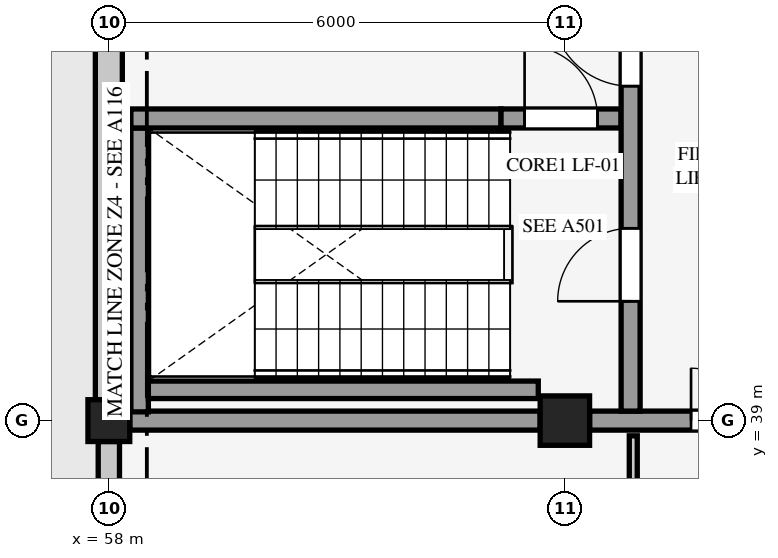
"""IFC4 building model, lengths in metres.
Left out: names, types, materials, properties, quantities, classifications, styles, units other than length and angle.
Written with IfcOpenShell. Run it as: python <this file> out.ifc"""

import sys

from ifc_helpers import new_model, si_unit, direction, frame, frame_2d, origin, origin_2d, place, context, subcontext, project, spatial, rectangle, extrude, element, fill, save


model = new_model("IFC4")
c1 = context("Model", 3, precision=1e-05, world=origin(), true_north=direction((0.0, 1.0)))
c2 = subcontext(c1, "Body", "Model", "MODEL_VIEW")
j1 = project(units=[si_unit("LENGTHUNIT", "METRE"), si_unit("PLANEANGLEUNIT", "RADIAN")], contexts=[c1])
p1 = place(None, origin())
s1 = spatial("IfcSite", under=j1, at=p1, CompositionType="ELEMENT")
p2 = place(p1, origin())
s2 = spatial("IfcBuilding", under=s1, at=p2, CompositionType="ELEMENT")
p3 = place(p2, frame((0.0, 0.0, 4.5)))
s3 = spatial("IfcBuildingStorey", under=s2, at=p3, CompositionType="ELEMENT", Elevation=4.5)
p4 = place(p3, frame((58.0, 39.0, 0.0), z_axis=(0.0, 0.0, 1.0), x_axis=(1.0, 0.0, 0.0)))
e1 = element("IfcColumn", 1, at=p4, inside=s3, PredefinedType="COLUMN", context=c2, shape_type="SweptSolid", body=[
    extrude(rectangle(XDim=0.55, YDim=0.55, at=origin_2d()), origin(), (0.0, 0.0, 1.0), 4.5),
])
p5 = place(p3, frame((64.0, 39.0, 0.0), z_axis=(0.0, 0.0, 1.0), x_axis=(1.0, 0.0, 0.0)))
e2 = element("IfcColumn", 2, at=p5, inside=s3, PredefinedType="COLUMN", context=c2, shape_type="SweptSolid", body=[
    extrude(rectangle(XDim=0.65, YDim=0.65, at=origin_2d()), origin(), (0.0, 0.0, 1.0), 4.5),
])
p6 = place(p3, frame((58.0, 33.25, 0.0), z_axis=(0.0, 0.0, 1.0), x_axis=(0.0, 1.0, 0.0)))
e3 = element("IfcWall", 3, at=p6, inside=s3, PredefinedType="SOLIDWALL", context=c2, shape_type="SweptSolid", body=[
    extrude(rectangle(XDim=5.475, YDim=0.28, at=frame_2d((2.738, 0.0))), origin(), (0.0, 0.0, 1.0), 3.821),
])
p7 = place(p6, frame((1.93, 0.0, 0.0)))
e4 = element("IfcOpeningElement", 4, at=p7, cuts=e3, PredefinedType="OPENING", context=c2, shape_type="SweptSolid", body=[
    extrude(rectangle(XDim=1.64, YDim=2.22, at=frame_2d((0.82, 1.11))), frame((0.0, 0.15, 0.0), z_axis=(0.0, -1.0, 0.0), x_axis=(1.0, 0.0, 0.0)), (0.0, 0.0, 1.0), 0.3),
])
p8 = place(p3, frame((58.0, 39.275, 0.0), z_axis=(0.0, 0.0, 1.0), x_axis=(0.0, 1.0, 0.0)))
e5 = element("IfcWall", 5, at=p8, inside=s3, PredefinedType="SOLIDWALL", context=c2, shape_type="SweptSolid", body=[
    extrude(rectangle(XDim=5.475, YDim=0.355, at=frame_2d((2.738, 0.0))), origin(), (0.0, 0.0, 1.0), 3.703),
])
p9 = place(p3, frame((58.275, 39.0, 0.0), z_axis=(0.0, 0.0, 1.0), x_axis=(1.0, 0.0, 0.0)))
e6 = element("IfcWall", 6, at=p9, inside=s3, PredefinedType="SHEAR", context=c2, shape_type="SweptSolid", body=[
    extrude(rectangle(XDim=5.4, YDim=0.25, at=frame_2d((2.7, 0.0))), origin(), (0.0, 0.0, 1.0), 4.228),
])
p10 = place(p3, frame((64.325, 39.0, 0.0), z_axis=(0.0, 0.0, 1.0), x_axis=(1.0, 0.0, 0.0)))
e7 = element("IfcWall", 7, at=p10, inside=s3, PredefinedType="SHEAR", context=c2, shape_type="SweptSolid", body=[
    extrude(rectangle(XDim=5.35, YDim=0.25, at=frame_2d((2.675, 0.0))), origin(), (0.0, 0.0, 1.0), 4.228),
])
p11 = place(p10, frame((1.335, 0.0, 0.0)))
e8 = element("IfcOpeningElement", 8, at=p11, cuts=e7, PredefinedType="OPENING", context=c2, shape_type="SweptSolid", body=[
    extrude(rectangle(XDim=1.38, YDim=2.16, at=frame_2d((0.69, 1.08))), frame((0.0, 0.135, 0.0), z_axis=(0.0, -1.0, 0.0), x_axis=(1.0, 0.0, 0.0)), (0.0, 0.0, 1.0), 0.27),
])
p12 = place(p3, frame((58.405, 39.115, 0.0), z_axis=(0.0, 0.0, 1.0), x_axis=(0.0, 1.0, 0.0)))
e9 = element("IfcWall", 9, at=p12, inside=s3, PredefinedType="SHEAR", context=c2, shape_type="SweptSolid", body=[
    extrude(rectangle(XDim=3.735, YDim=0.23, at=frame_2d((1.868, 0.0))), origin(), (0.0, 0.0, 1.0), 4.5),
])
p13 = place(p3, frame((58.52, 39.405, 0.0), z_axis=(0.0, 0.0, 1.0), x_axis=(1.0, 0.0, 0.0)))
e10 = element("IfcWall", 10, at=p13, inside=s3, PredefinedType="SHEAR", context=c2, shape_type="SweptSolid", body=[
    extrude(rectangle(XDim=5.13, YDim=0.23, at=frame_2d((2.565, 0.0))), origin(), (0.0, 0.0, 1.0), 4.5),
])
p14 = place(p3, frame((58.29, 42.975, 0.0), z_axis=(0.0, 0.0, 1.0), x_axis=(1.0, 0.0, 0.0)))
e11 = element("IfcWall", 11, at=p14, inside=s3, PredefinedType="SHEAR", context=c2, shape_type="SweptSolid", body=[
    extrude(rectangle(XDim=4.87, YDim=0.25, at=frame_2d((2.435, 0.0))), origin(), (0.0, 0.0, 1.0), 4.5),
])
p15 = place(p3, frame((63.16, 42.975, 0.0), z_axis=(0.0, 0.0, 1.0), x_axis=(1.0, 0.0, 0.0)))
e12 = element("IfcWall", 12, at=p15, inside=s3, PredefinedType="SHEAR", context=c2, shape_type="SweptSolid", body=[
    extrude(rectangle(XDim=1.58, YDim=0.25, at=frame_2d((0.79, 0.0))), origin(), (0.0, 0.0, 1.0), 4.228),
])
p16 = place(p15, frame((0.31, 0.0, 0.0)))
e13 = element("IfcOpeningElement", 13, at=p16, cuts=e12, PredefinedType="OPENING", context=c2, shape_type="SweptSolid", body=[
    extrude(rectangle(XDim=0.96, YDim=2.12, at=frame_2d((0.48, 1.06))), frame((0.0, 0.135, 0.0), z_axis=(0.0, -1.0, 0.0), x_axis=(1.0, 0.0, 0.0)), (0.0, 0.0, 1.0), 0.27),
])
p17 = place(p3, frame((64.865, 39.125, 0.0), z_axis=(0.0, 0.0, 1.0), x_axis=(0.0, 1.0, 0.0)))
e14 = element("IfcWall", 14, at=p17, inside=s3, PredefinedType="SHEAR", context=c2, shape_type="SweptSolid", body=[
    extrude(rectangle(XDim=5.75, YDim=0.25, at=frame_2d((2.875, 0.0))), origin(), (0.0, 0.0, 1.0), 4.228),
])
p18 = place(p17, frame((4.275, 0.0, 0.0)))
e15 = element("IfcOpeningElement", 15, at=p18, cuts=e14, PredefinedType="OPENING", context=c2, shape_type="SweptSolid", body=[
    extrude(rectangle(XDim=1.04, YDim=2.14, at=frame_2d((0.52, 1.07))), frame((0.0, 0.135, 0.0), z_axis=(0.0, -1.0, 0.0), x_axis=(1.0, 0.0, 0.0)), (0.0, 0.0, 1.0), 0.27),
])
p19 = place(p17, frame((1.445, 0.0, 0.0)))
e16 = element("IfcOpeningElement", 16, at=p19, cuts=e14, PredefinedType="OPENING", context=c2, shape_type="SweptSolid", body=[
    extrude(rectangle(XDim=0.96, YDim=2.12, at=frame_2d((0.48, 1.06))), frame((0.0, 0.135, 0.0), z_axis=(0.0, -1.0, 0.0), x_axis=(1.0, 0.0, 0.0)), (0.0, 0.0, 1.0), 0.27),
])
p20 = place(p3, frame((64.9, 32.0, 0.0), z_axis=(0.0, 0.0, 1.0), x_axis=(0.0, 1.0, 0.0)))
e17 = element("IfcWall", 17, at=p20, inside=s3, PredefinedType="PARTITIONING", context=c2, shape_type="SweptSolid", body=[
    extrude(rectangle(XDim=6.8, YDim=0.105, at=frame_2d((3.4, 0.0))), origin(), (0.0, 0.0, 1.0), 4.24),
])
p21 = place(p20, frame((2.28, 0.0, 0.0)))
e18 = element("IfcOpeningElement", 18, at=p21, cuts=e17, PredefinedType="OPENING", context=c2, shape_type="SweptSolid", body=[
    extrude(rectangle(XDim=2.24, YDim=2.4, at=frame_2d((1.12, 1.2))), frame((0.0, 0.062, 0.0), z_axis=(0.0, -1.0, 0.0), x_axis=(1.0, 0.0, 0.0)), (0.0, 0.0, 1.0), 0.125),
])
p22 = place(p11, origin())
e19 = element("IfcDoor", 19, at=p22, inside=s3, OperationType="DOUBLE_DOOR_SINGLE_SWING", PredefinedType="DOOR", context=c2, shape_type="SweptSolid", body=[
    extrude(rectangle(XDim=1.38, YDim=2.16, at=frame_2d((0.69, 1.08))), frame((0.0, 0.025, 0.0), z_axis=(0.0, -1.0, 0.0), x_axis=(1.0, 0.0, 0.0)), (0.0, 0.0, 1.0), 0.05),
])
fill(e8, e19)
p23 = place(p16, origin())
e20 = element("IfcDoor", 20, at=p23, inside=s3, OperationType="SINGLE_SWING_LEFT", PredefinedType="DOOR", context=c2, shape_type="SweptSolid", body=[
    extrude(rectangle(XDim=0.96, YDim=2.12, at=frame_2d((0.48, 1.06))), frame((0.0, 0.025, 0.0), z_axis=(0.0, -1.0, 0.0), x_axis=(1.0, 0.0, 0.0)), (0.0, 0.0, 1.0), 0.05),
])
fill(e13, e20)
p24 = place(p18, origin())
e21 = element("IfcDoor", 21, at=p24, inside=s3, OperationType="SINGLE_SWING_RIGHT", PredefinedType="DOOR", context=c2, shape_type="SweptSolid", body=[
    extrude(rectangle(XDim=1.04, YDim=2.14, at=frame_2d((0.52, 1.07))), frame((0.0, 0.025, 0.0), z_axis=(0.0, -1.0, 0.0), x_axis=(1.0, 0.0, 0.0)), (0.0, 0.0, 1.0), 0.05),
])
fill(e15, e21)
p25 = place(p19, origin())
e22 = element("IfcDoor", 22, at=p25, inside=s3, OperationType="SINGLE_SWING_LEFT", PredefinedType="DOOR", context=c2, shape_type="SweptSolid", body=[
    extrude(rectangle(XDim=0.96, YDim=2.12, at=frame_2d((0.48, 1.06))), frame((0.0, 0.025, 0.0), z_axis=(0.0, -1.0, 0.0), x_axis=(1.0, 0.0, 0.0)), (0.0, 0.0, 1.0), 0.05),
])
fill(e16, e22)
save(model, sys.argv[1])
